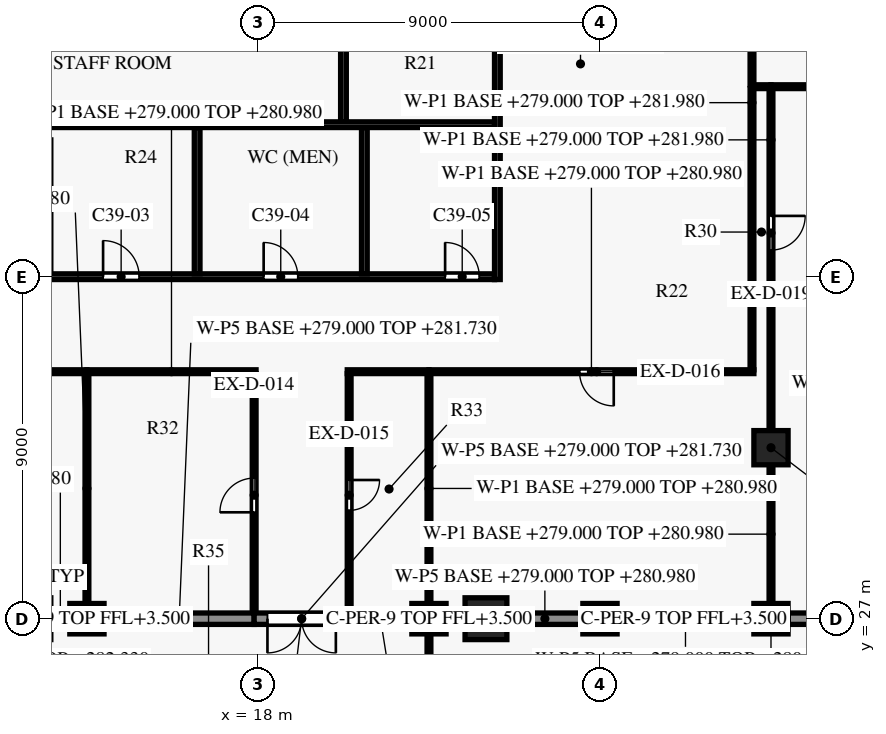
"""IFC4 building model, lengths in metres.
Left out: names, types, materials, properties, quantities, classifications, styles, units other than length and angle.
Written with IfcOpenShell. Run it as: python <this file> out.ifc"""

import sys

from ifc_helpers import new_model, si_unit, direction, frame, frame_2d, origin, origin_2d, place, context, subcontext, project, spatial, rectangle, extrude, element, fill, save


model = new_model("IFC4")
c1 = context("Model", 3, precision=1e-05, world=origin(), true_north=direction((0.0, 1.0)))
c2 = subcontext(c1, "Body", "Model", "MODEL_VIEW")
j1 = project(units=[si_unit("LENGTHUNIT", "METRE"), si_unit("PLANEANGLEUNIT", "RADIAN")], contexts=[c1])
p1 = place(None, origin())
s1 = spatial("IfcSite", under=j1, at=p1, CompositionType="ELEMENT")
p2 = place(p1, origin())
s2 = spatial("IfcBuilding", under=s1, at=p2, CompositionType="ELEMENT")
p3 = place(p2, frame((0.0, 0.0, 279.0)))
s3 = spatial("IfcBuildingStorey", under=s2, at=p3, CompositionType="ELEMENT", Elevation=279.0)
p4 = place(p3, frame((24.0, 27.0, 0.0), z_axis=(0.0, 0.0, 1.0), x_axis=(1.0, 0.0, 0.0)))
e1 = element("IfcColumn", 1, at=p4, inside=s3, PredefinedType="COLUMN", context=c2, shape_type="SweptSolid", body=[
    extrude(rectangle(XDim=1.1, YDim=1.1, at=origin_2d()), origin(), (0.0, 0.0, 1.0), 3.8),
])
p5 = place(p3, frame((12.4, 36.0, 0.0), z_axis=(0.0, 0.0, 1.0), x_axis=(1.0, 0.0, 0.0)))
e2 = element("IfcWall", 2, at=p5, inside=s3, PredefinedType="SHEAR", context=c2, shape_type="SweptSolid", body=[
    extrude(rectangle(XDim=11.825, YDim=0.15, at=frame_2d((5.913, 0.0))), origin(), (0.0, 0.0, 1.0), 3.5),
])
p6 = place(p5, frame((1.525, 0.0, 0.0)))
e3 = element("IfcOpeningElement", 3, at=p6, cuts=e2, PredefinedType="OPENING", context=c2, shape_type="SweptSolid", body=[
    extrude(rectangle(XDim=0.95, YDim=2.1, at=frame_2d((0.475, 1.05))), frame((0.0, 0.085, 0.0), z_axis=(0.0, -1.0, 0.0), x_axis=(1.0, 0.0, 0.0)), (0.0, 0.0, 1.0), 0.17),
])
p7 = place(p5, frame((5.75, 0.0, 0.0)))
e4 = element("IfcOpeningElement", 4, at=p7, cuts=e2, PredefinedType="OPENING", context=c2, shape_type="SweptSolid", body=[
    extrude(rectangle(XDim=0.9, YDim=2.1, at=frame_2d((0.45, 1.05))), frame((0.0, 0.085, 0.0), z_axis=(0.0, -1.0, 0.0), x_axis=(1.0, 0.0, 0.0)), (0.0, 0.0, 1.0), 0.17),
])
p8 = place(p5, frame((10.525, 0.0, 0.0)))
e5 = element("IfcOpeningElement", 5, at=p8, cuts=e2, PredefinedType="OPENING", context=c2, shape_type="SweptSolid", body=[
    extrude(rectangle(XDim=0.9, YDim=2.1, at=frame_2d((0.45, 1.05))), frame((0.0, 0.085, 0.0), z_axis=(0.0, -1.0, 0.0), x_axis=(1.0, 0.0, 0.0)), (0.0, 0.0, 1.0), 0.17),
])
p9 = place(p3, frame((8.1, 40.0, 0.0), z_axis=(0.0, 0.0, 1.0), x_axis=(1.0, 0.0, 0.0)))
e6 = element("IfcWall", 6, at=p9, inside=s3, PredefinedType="SHEAR", context=c2, shape_type="SweptSolid", body=[
    extrude(rectangle(XDim=16.125, YDim=0.15, at=frame_2d((8.062, 0.0))), origin(), (0.0, 0.0, 1.0), 3.5),
])
p10 = place(p3, frame((16.4, 36.075, 0.0), z_axis=(0.0, 0.0, 1.0), x_axis=(0.0, 1.0, 0.0)))
e7 = element("IfcWall", 7, at=p10, inside=s3, PredefinedType="SHEAR", context=c2, shape_type="SweptSolid", body=[
    extrude(rectangle(XDim=3.85, YDim=0.15, at=frame_2d((1.925, 0.0))), origin(), (0.0, 0.0, 1.0), 3.5),
])
p11 = place(p3, frame((20.25, 40.075, 0.0), z_axis=(0.0, 0.0, 1.0), x_axis=(0.0, 1.0, 0.0)))
e8 = element("IfcWall", 8, at=p11, inside=s3, PredefinedType="SHEAR", context=c2, shape_type="SweptSolid", body=[
    extrude(rectangle(XDim=3.05, YDim=0.15, at=frame_2d((1.525, 0.0))), origin(), (0.0, 0.0, 1.0), 3.5),
])
p12 = place(p3, frame((20.8, 36.075, 0.0), z_axis=(0.0, 0.0, 1.0), x_axis=(0.0, 1.0, 0.0)))
e9 = element("IfcWall", 9, at=p12, inside=s3, PredefinedType="SHEAR", context=c2, shape_type="SweptSolid", body=[
    extrude(rectangle(XDim=3.85, YDim=0.15, at=frame_2d((1.925, 0.0))), origin(), (0.0, 0.0, 1.0), 3.5),
])
p13 = place(p3, frame((24.3, 35.925, 0.0), z_axis=(0.0, 0.0, 1.0), x_axis=(0.0, 1.0, 0.0)))
e10 = element("IfcWall", 10, at=p13, inside=s3, PredefinedType="SHEAR", context=c2, shape_type="SweptSolid", body=[
    extrude(rectangle(XDim=7.35, YDim=0.15, at=frame_2d((3.675, 0.0))), origin(), (0.0, 0.0, 1.0), 3.5),
])
p14 = place(p3, frame((22.5, 26.595, 0.0), z_axis=(0.0, 0.0, 1.0), x_axis=(0.0, -1.0, 0.0)))
e11 = element("IfcWall", 11, at=p14, inside=s3, PredefinedType="PARTITIONING", context=c2, shape_type="SweptSolid", body=[
    extrude(rectangle(XDim=3.145, YDim=0.1, at=frame_2d((1.573, 0.0))), origin(), (0.0, 0.0, 1.0), 3.33),
])
p15 = place(p14, frame((1.82, 0.0, 0.0)))
e12 = element("IfcOpeningElement", 12, at=p15, cuts=e11, PredefinedType="OPENING", context=c2, shape_type="SweptSolid", body=[
    extrude(rectangle(XDim=0.9, YDim=2.1, at=frame_2d((0.45, 1.05))), frame((0.0, 0.06, 0.0), z_axis=(0.0, -1.0, 0.0), x_axis=(1.0, 0.0, 0.0)), (0.0, 0.0, 1.0), 0.12),
])
p16 = place(p3, frame((12.555, 27.0, 0.0), z_axis=(0.0, 0.0, 1.0), x_axis=(1.0, 0.0, 0.0)))
e13 = element("IfcWall", 13, at=p16, inside=s3, PredefinedType="PARTITIONING", context=c2, shape_type="SweptSolid", body=[
    extrude(rectangle(XDim=0.49, YDim=0.3, at=frame_2d((0.245, 0.0))), origin(), (0.0, 0.0, 1.0), 1.98),
])
p17 = place(p3, frame((13.955, 27.0, 0.0), z_axis=(0.0, 0.0, 1.0), x_axis=(1.0, 0.0, 0.0)))
e14 = element("IfcWall", 14, at=p17, inside=s3, PredefinedType="PARTITIONING", context=c2, shape_type="SweptSolid", body=[
    extrude(rectangle(XDim=3.945, YDim=0.3, at=frame_2d((1.972, 0.0))), origin(), (0.0, 0.0, 1.0), 2.73),
])
p18 = place(p3, frame((20.4, 27.0, 0.0), z_axis=(0.0, 0.0, 1.0), x_axis=(-1.0, 0.0, 0.0)))
e15 = element("IfcWall", 15, at=p18, inside=s3, PredefinedType="PARTITIONING", context=c2, shape_type="SweptSolid", body=[
    extrude(rectangle(XDim=2.5, YDim=0.3, at=frame_2d((1.25, 0.0))), origin(), (0.0, 0.0, 1.0), 2.73),
])
p19 = place(p18, frame((0.35, 0.0, 0.0)))
e16 = element("IfcOpeningElement", 16, at=p19, cuts=e15, PredefinedType="OPENING", context=c2, shape_type="SweptSolid", body=[
    extrude(rectangle(XDim=1.8, YDim=2.1, at=frame_2d((0.9, 1.05))), frame((0.0, 0.16, 0.0), z_axis=(0.0, -1.0, 0.0), x_axis=(1.0, 0.0, 0.0)), (0.0, 0.0, 1.0), 0.32),
])
p20 = place(p3, frame((20.4, 27.0, 0.0), z_axis=(0.0, 0.0, 1.0), x_axis=(1.0, 0.0, 0.0)))
e17 = element("IfcWall", 17, at=p20, inside=s3, PredefinedType="PARTITIONING", context=c2, shape_type="SweptSolid", body=[
    extrude(rectangle(XDim=1.645, YDim=0.3, at=frame_2d((0.823, 0.0))), origin(), (0.0, 0.0, 1.0), 2.73),
])
p21 = place(p3, frame((22.955, 27.0, 0.0), z_axis=(0.0, 0.0, 1.0), x_axis=(1.0, 0.0, 0.0)))
e18 = element("IfcWall", 18, at=p21, inside=s3, PredefinedType="PARTITIONING", context=c2, shape_type="SweptSolid", body=[
    extrude(rectangle(XDim=0.49, YDim=0.3, at=frame_2d((0.245, 0.0))), origin(), (0.0, 0.0, 1.0), 1.98),
])
p22 = place(p3, frame((24.555, 27.0, 0.0), z_axis=(0.0, 0.0, 1.0), x_axis=(1.0, 0.0, 0.0)))
e19 = element("IfcWall", 19, at=p22, inside=s3, PredefinedType="PARTITIONING", context=c2, shape_type="SweptSolid", body=[
    extrude(rectangle(XDim=1.99, YDim=0.3, at=frame_2d((0.995, 0.0))), origin(), (0.0, 0.0, 1.0), 1.98),
])
p23 = place(p3, frame((27.455, 27.0, 0.0), z_axis=(0.0, 0.0, 1.0), x_axis=(1.0, 0.0, 0.0)))
e20 = element("IfcWall", 20, at=p23, inside=s3, PredefinedType="PARTITIONING", context=c2, shape_type="SweptSolid", body=[
    extrude(rectangle(XDim=3.59, YDim=0.3, at=frame_2d((1.795, 0.0))), origin(), (0.0, 0.0, 1.0), 1.98),
])
p24 = place(p3, frame((31.955, 27.0, 0.0), z_axis=(0.0, 0.0, 1.0), x_axis=(1.0, 0.0, 0.0)))
e21 = element("IfcWall", 21, at=p24, inside=s3, PredefinedType="PARTITIONING", context=c2, shape_type="SweptSolid", body=[
    extrude(rectangle(XDim=3.271, YDim=0.3, at=frame_2d((1.636, 0.0))), origin(), (0.0, 0.0, 1.0), 2.73),
])
p25 = place(p3, frame((17.9, 27.17, 0.0), z_axis=(0.0, 0.0, 1.0), x_axis=(0.0, 1.0, 0.0)))
e22 = element("IfcWall", 22, at=p25, inside=s3, PredefinedType="PARTITIONING", context=c2, shape_type="SweptSolid", body=[
    extrude(rectangle(XDim=6.28, YDim=0.1, at=frame_2d((3.14, 0.0))), origin(), (0.0, 0.0, 1.0), 2.73),
])
p26 = place(p25, frame((2.63, 0.0, 0.0)))
e23 = element("IfcOpeningElement", 23, at=p26, cuts=e22, PredefinedType="OPENING", context=c2, shape_type="SweptSolid", body=[
    extrude(rectangle(XDim=0.9, YDim=2.1, at=frame_2d((0.45, 1.05))), frame((0.0, 0.06, 0.0), z_axis=(0.0, -1.0, 0.0), x_axis=(1.0, 0.0, 0.0)), (0.0, 0.0, 1.0), 0.12),
])
p27 = place(p3, frame((31.5, 31.045, 0.0), z_axis=(0.0, 0.0, 1.0), x_axis=(0.0, -1.0, 0.0)))
e24 = element("IfcWall", 24, at=p27, inside=s3, PredefinedType="PARTITIONING", context=c2, shape_type="SweptSolid", body=[
    extrude(rectangle(XDim=3.64, YDim=0.1, at=frame_2d((1.82, 0.0))), origin(), (0.0, 0.0, 1.0), 1.98),
])
p28 = place(p3, frame((13.5, 33.45, 0.0), z_axis=(0.0, 0.0, 1.0), x_axis=(0.0, -1.0, 0.0)))
e25 = element("IfcWall", 25, at=p28, inside=s3, PredefinedType="PARTITIONING", context=c2, shape_type="SweptSolid", body=[
    extrude(rectangle(XDim=6.045, YDim=0.1, at=frame_2d((3.022, 0.0))), origin(), (0.0, 0.0, 1.0), 1.98),
])
p29 = place(p3, frame((20.4, 33.45, 0.0), z_axis=(0.0, 0.0, 1.0), x_axis=(0.0, -1.0, 0.0)))
e26 = element("IfcWall", 26, at=p29, inside=s3, PredefinedType="PARTITIONING", context=c2, shape_type="SweptSolid", body=[
    extrude(rectangle(XDim=6.28, YDim=0.1, at=frame_2d((3.14, 0.0))), origin(), (0.0, 0.0, 1.0), 2.73),
])
p30 = place(p29, frame((2.8, 0.0, 0.0)))
e27 = element("IfcOpeningElement", 27, at=p30, cuts=e26, PredefinedType="OPENING", context=c2, shape_type="SweptSolid", body=[
    extrude(rectangle(XDim=0.8, YDim=2.1, at=frame_2d((0.4, 1.05))), frame((0.0, 0.06, 0.0), z_axis=(0.0, -1.0, 0.0), x_axis=(1.0, 0.0, 0.0)), (0.0, 0.0, 1.0), 0.12),
])
p31 = place(p3, frame((22.5, 33.45, 0.0), z_axis=(0.0, 0.0, 1.0), x_axis=(0.0, -1.0, 0.0)))
e28 = element("IfcWall", 28, at=p31, inside=s3, PredefinedType="PARTITIONING", context=c2, shape_type="SweptSolid", body=[
    extrude(rectangle(XDim=6.045, YDim=0.1, at=frame_2d((3.022, 0.0))), origin(), (0.0, 0.0, 1.0), 1.98),
])
p32 = place(p3, frame((13.5, 33.5, 0.0), z_axis=(0.0, 0.0, 1.0), x_axis=(-1.0, 0.0, 0.0)))
e29 = element("IfcWall", 29, at=p32, inside=s3, PredefinedType="PARTITIONING", context=c2, shape_type="SweptSolid", body=[
    extrude(rectangle(XDim=4.54, YDim=0.1, at=frame_2d((2.27, 0.0))), origin(), (0.0, 0.0, 1.0), 1.98),
])
p33 = place(p32, frame((1.982, 0.0, 0.0)))
e30 = element("IfcOpeningElement", 30, at=p33, cuts=e29, PredefinedType="OPENING", context=c2, shape_type="SweptSolid", body=[
    extrude(rectangle(XDim=0.9, YDim=2.1, at=frame_2d((0.45, 1.05))), frame((0.0, 0.06, 0.0), z_axis=(0.0, -1.0, 0.0), x_axis=(1.0, 0.0, 0.0)), (0.0, 0.0, 1.0), 0.12),
])
p34 = place(p3, frame((17.95, 33.5, 0.0), z_axis=(0.0, 0.0, 1.0), x_axis=(-1.0, 0.0, 0.0)))
e31 = element("IfcWall", 31, at=p34, inside=s3, PredefinedType="PARTITIONING", context=c2, shape_type="SweptSolid", body=[
    extrude(rectangle(XDim=4.45, YDim=0.1, at=frame_2d((2.225, 0.0))), origin(), (0.0, 0.0, 1.0), 1.98),
])
p35 = place(p3, frame((22.5, 33.5, 0.0), z_axis=(0.0, 0.0, 1.0), x_axis=(-1.0, 0.0, 0.0)))
e32 = element("IfcWall", 32, at=p35, inside=s3, PredefinedType="PARTITIONING", context=c2, shape_type="SweptSolid", body=[
    extrude(rectangle(XDim=2.15, YDim=0.1, at=frame_2d((1.075, 0.0))), origin(), (0.0, 0.0, 1.0), 1.98),
])
p36 = place(p3, frame((31.05, 33.5, 0.0), z_axis=(0.0, 0.0, 1.0), x_axis=(-1.0, 0.0, 0.0)))
e33 = element("IfcWall", 33, at=p36, inside=s3, PredefinedType="PARTITIONING", context=c2, shape_type="SweptSolid", body=[
    extrude(rectangle(XDim=8.55, YDim=0.1, at=frame_2d((4.275, 0.0))), origin(), (0.0, 0.0, 1.0), 1.98),
])
p37 = place(p36, frame((3.688, 0.0, 0.0)))
e34 = element("IfcOpeningElement", 34, at=p37, cuts=e33, PredefinedType="OPENING", context=c2, shape_type="SweptSolid", body=[
    extrude(rectangle(XDim=0.9, YDim=2.1, at=frame_2d((0.45, 1.05))), frame((0.0, 0.06, 0.0), z_axis=(0.0, -1.0, 0.0), x_axis=(1.0, 0.0, 0.0)), (0.0, 0.0, 1.0), 0.12),
])
p38 = place(p3, frame((31.0, 40.95, 0.0), z_axis=(0.0, 0.0, 1.0), x_axis=(0.0, -1.0, 0.0)))
e35 = element("IfcWall", 35, at=p38, inside=s3, PredefinedType="PARTITIONING", context=c2, shape_type="SweptSolid", body=[
    extrude(rectangle(XDim=7.4, YDim=0.1, at=frame_2d((3.7, 0.0))), origin(), (0.0, 0.0, 1.0), 2.98),
])
p39 = place(p3, frame((31.5, 40.95, 0.0), z_axis=(0.0, 0.0, 1.0), x_axis=(0.0, -1.0, 0.0)))
e36 = element("IfcWall", 36, at=p39, inside=s3, PredefinedType="PARTITIONING", context=c2, shape_type="SweptSolid", body=[
    extrude(rectangle(XDim=8.995, YDim=0.1, at=frame_2d((4.498, 0.0))), origin(), (0.0, 0.0, 1.0), 2.98),
])
p40 = place(p39, frame((3.35, 0.0, 0.0)))
e37 = element("IfcOpeningElement", 37, at=p40, cuts=e36, PredefinedType="OPENING", context=c2, shape_type="SweptSolid", body=[
    extrude(rectangle(XDim=0.9, YDim=2.1, at=frame_2d((0.45, 1.05))), frame((0.0, 0.06, 0.0), z_axis=(0.0, -1.0, 0.0), x_axis=(1.0, 0.0, 0.0)), (0.0, 0.0, 1.0), 0.12),
])
p41 = place(p3, frame((31.05, 41.0, 0.0), z_axis=(0.0, 0.0, 1.0), x_axis=(1.0, 0.0, 0.0)))
e38 = element("IfcWall", 38, at=p41, inside=s3, PredefinedType="PARTITIONING", context=c2, shape_type="SweptSolid", body=[
    extrude(rectangle(XDim=0.45, YDim=0.1, at=frame_2d((0.225, 0.0))), origin(), (0.0, 0.0, 1.0), 3.33),
])
p42 = place(p3, frame((35.95, 41.0, 0.0), z_axis=(0.0, 0.0, 1.0), x_axis=(-1.0, 0.0, 0.0)))
e39 = element("IfcWall", 39, at=p42, inside=s3, PredefinedType="PARTITIONING", context=c2, shape_type="SweptSolid", body=[
    extrude(rectangle(XDim=4.45, YDim=0.1, at=frame_2d((2.225, 0.0))), origin(), (0.0, 0.0, 1.0), 1.98),
])
p43 = place(p3, frame((31.0, 54.95, 0.0), z_axis=(0.0, 0.0, 1.0), x_axis=(0.0, -1.0, 0.0)))
e40 = element("IfcWall", 40, at=p43, inside=s3, PredefinedType="PARTITIONING", context=c2, shape_type="SweptSolid", body=[
    extrude(rectangle(XDim=13.9, YDim=0.1, at=frame_2d((6.95, 0.0))), origin(), (0.0, 0.0, 1.0), 2.98),
])
p44 = place(p43, frame((6.5, 0.0, 0.0)))
e41 = element("IfcOpeningElement", 41, at=p44, cuts=e40, PredefinedType="OPENING", context=c2, shape_type="SweptSolid", body=[
    extrude(rectangle(XDim=0.9, YDim=2.1, at=frame_2d((0.45, 1.05))), frame((0.0, 0.06, 0.0), z_axis=(0.0, -1.0, 0.0), x_axis=(1.0, 0.0, 0.0)), (0.0, 0.0, 1.0), 0.12),
])
for number, where, z_axis, x_axis in (
    (42, (13.5, 27.0, 0.0), (0.0, 0.0, 1.0), (1.0, 0.0, 0.0)),
    (43, (22.5, 27.0, 0.0), (0.0, 0.0, 1.0), (1.0, 0.0, 0.0)),
    (44, (27.0, 27.0, 0.0), (0.0, 0.0, 1.0), (1.0, 0.0, 0.0)),
    (45, (31.5, 27.0, 0.0), (0.0, 0.0, 1.0), (1.0, 0.0, 0.0)),
):
    element("IfcColumn", number, at=place(p3, frame(where, z_axis=z_axis, x_axis=x_axis)), inside=s3, PredefinedType="COLUMN", context=c2, shape_type="SweptSolid", body=[
        extrude(rectangle(XDim=0.9, YDim=0.8, at=origin_2d()), origin(), (0.0, 0.0, 1.0), 3.5),
    ])
p45 = place(p3, frame((31.5, 31.5, 0.0), z_axis=(0.0, 0.0, 1.0), x_axis=(1.0, 0.0, 0.0)))
e46 = element("IfcColumn", 46, at=p45, inside=s3, PredefinedType="COLUMN", context=c2, shape_type="SweptSolid", body=[
    extrude(rectangle(XDim=0.9, YDim=0.9, at=origin_2d()), origin(), (0.0, 0.0, 1.0), 3.5),
])
p46 = place(p6, origin())
e47 = element("IfcDoor", 47, at=p46, inside=s3, OperationType="SINGLE_SWING_RIGHT", PredefinedType="DOOR", context=c2, shape_type="SweptSolid", body=[
    extrude(rectangle(XDim=0.95, YDim=2.1, at=frame_2d((0.475, 1.05))), frame((0.0, 0.025, 0.0), z_axis=(0.0, -1.0, 0.0), x_axis=(1.0, 0.0, 0.0)), (0.0, 0.0, 1.0), 0.05),
])
fill(e3, e47)
p47 = place(p7, origin())
e48 = element("IfcDoor", 48, at=p47, inside=s3, OperationType="SINGLE_SWING_LEFT", PredefinedType="DOOR", context=c2, shape_type="SweptSolid", body=[
    extrude(rectangle(XDim=0.9, YDim=2.1, at=frame_2d((0.45, 1.05))), frame((0.0, 0.025, 0.0), z_axis=(0.0, -1.0, 0.0), x_axis=(1.0, 0.0, 0.0)), (0.0, 0.0, 1.0), 0.05),
])
fill(e4, e48)
p48 = place(p8, origin())
e49 = element("IfcDoor", 49, at=p48, inside=s3, OperationType="SINGLE_SWING_RIGHT", PredefinedType="DOOR", context=c2, shape_type="SweptSolid", body=[
    extrude(rectangle(XDim=0.9, YDim=2.1, at=frame_2d((0.45, 1.05))), frame((0.0, 0.025, 0.0), z_axis=(0.0, -1.0, 0.0), x_axis=(1.0, 0.0, 0.0)), (0.0, 0.0, 1.0), 0.05),
])
fill(e5, e49)
p49 = place(p26, origin())
e50 = element("IfcDoor", 50, at=p49, inside=s3, OperationType="SINGLE_SWING_RIGHT", PredefinedType="DOOR", context=c2, shape_type="SweptSolid", body=[
    extrude(rectangle(XDim=0.9, YDim=2.1, at=frame_2d((0.45, 1.05))), frame((0.0, 0.025, 0.0), z_axis=(0.0, -1.0, 0.0), x_axis=(1.0, 0.0, 0.0)), (0.0, 0.0, 1.0), 0.05),
])
fill(e23, e50)
p50 = place(p30, origin())
e51 = element("IfcDoor", 51, at=p50, inside=s3, OperationType="SINGLE_SWING_LEFT", PredefinedType="DOOR", context=c2, shape_type="SweptSolid", body=[
    extrude(rectangle(XDim=0.8, YDim=2.1, at=frame_2d((0.4, 1.05))), frame((0.0, 0.025, 0.0), z_axis=(0.0, -1.0, 0.0), x_axis=(1.0, 0.0, 0.0)), (0.0, 0.0, 1.0), 0.05),
])
fill(e27, e51)
p51 = place(p37, origin())
e52 = element("IfcDoor", 52, at=p51, inside=s3, OperationType="SINGLE_SWING_LEFT", PredefinedType="DOOR", context=c2, shape_type="SweptSolid", body=[
    extrude(rectangle(XDim=0.9, YDim=2.1, at=frame_2d((0.45, 1.05))), frame((0.0, 0.025, 0.0), z_axis=(0.0, -1.0, 0.0), x_axis=(1.0, 0.0, 0.0)), (0.0, 0.0, 1.0), 0.05),
])
fill(e34, e52)
p52 = place(p40, origin())
e53 = element("IfcDoor", 53, at=p52, inside=s3, OperationType="SINGLE_SWING_LEFT", PredefinedType="DOOR", context=c2, shape_type="SweptSolid", body=[
    extrude(rectangle(XDim=0.9, YDim=2.1, at=frame_2d((0.45, 1.05))), frame((0.0, 0.025, 0.0), z_axis=(0.0, -1.0, 0.0), x_axis=(1.0, 0.0, 0.0)), (0.0, 0.0, 1.0), 0.05),
])
fill(e37, e53)
p53 = place(p19, origin())
e54 = element("IfcDoor", 54, at=p53, inside=s3, OperationType="DOUBLE_DOOR_SINGLE_SWING", PredefinedType="DOOR", context=c2, shape_type="SweptSolid", body=[
    extrude(rectangle(XDim=1.8, YDim=2.1, at=frame_2d((0.9, 1.05))), frame((0.0, 0.025, 0.0), z_axis=(0.0, -1.0, 0.0), x_axis=(1.0, 0.0, 0.0)), (0.0, 0.0, 1.0), 0.05),
])
fill(e16, e54)
save(model, sys.argv[1])
